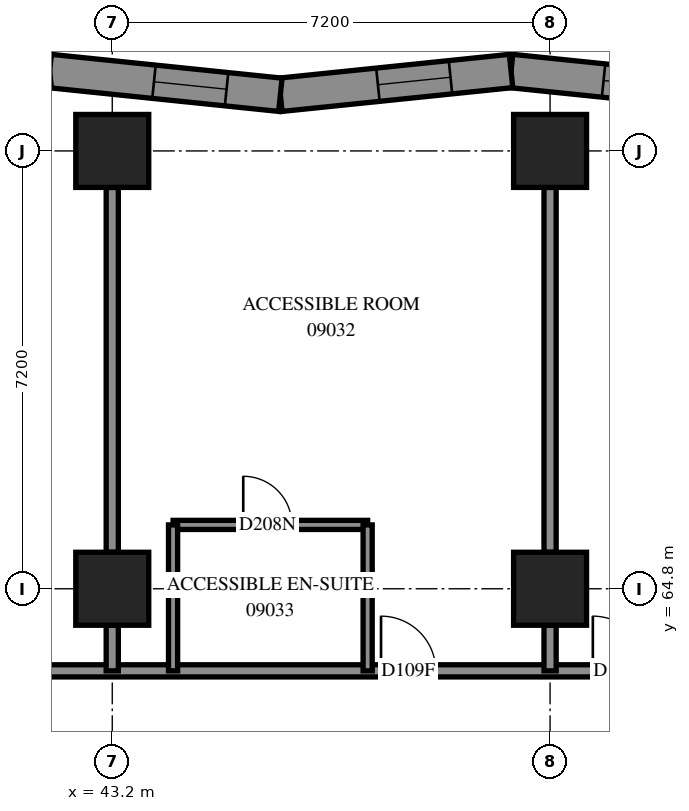
"""IFC4 building model, lengths in metres.
Left out: names, types, materials, properties, quantities, classifications, styles, units other than length and angle.
Written with IfcOpenShell. Run it as: python <this file> out.ifc"""

import sys

from ifc_helpers import new_model, si_unit, direction, frame, frame_2d, origin, origin_2d, place, context, subcontext, project, spatial, polyline, rectangle, outline, extrude, element, fill, save


model = new_model("IFC4")
c1 = context("Model", 3, precision=1e-05, world=origin(), true_north=direction((0.0, 1.0)))
c2 = subcontext(c1, "Body", "Model", "MODEL_VIEW")
j1 = project(units=[si_unit("LENGTHUNIT", "METRE"), si_unit("PLANEANGLEUNIT", "RADIAN")], contexts=[c1])
p1 = place(None, origin())
s1 = spatial("IfcSite", under=j1, at=p1, CompositionType="ELEMENT")
p2 = place(p1, origin())
s2 = spatial("IfcBuilding", under=s1, at=p2, CompositionType="ELEMENT")
p3 = place(p2, frame((0.0, 0.0, 37.2)))
s3 = spatial("IfcBuildingStorey", under=s2, at=p3, CompositionType="ELEMENT", Elevation=37.2)
for number, where, z_axis, x_axis in (
    (1, (43.2, 64.8, 0.0), (0.0, 0.0, 1.0), (1.0, 0.0, 0.0)),
    (2, (43.2, 72.0, 0.0), (0.0, 0.0, 1.0), (1.0, 0.0, 0.0)),
    (3, (50.4, 64.8, 0.0), (0.0, 0.0, 1.0), (1.0, 0.0, 0.0)),
    (4, (50.4, 72.0, 0.0), (0.0, 0.0, 1.0), (1.0, 0.0, 0.0)),
):
    element("IfcColumn", number, at=place(p3, frame(where, z_axis=z_axis, x_axis=x_axis)), inside=s3, PredefinedType="COLUMN", context=c2, shape_type="SweptSolid", body=[
        extrude(rectangle(XDim=1.2, YDim=1.2, at=origin_2d()), origin(), (0.0, 0.0, 1.0), 3.1),
    ])
p4 = place(p3, frame((53.552, 72.924, 0.0), z_axis=(0.0, 0.0, 1.0), x_axis=(-0.9947306832, 0.1025225234, 0.0)))
e5 = element("IfcWall", 5, at=p4, inside=s3, PredefinedType="SOLIDWALL", context=c2, shape_type="SweptSolid", body=[
    extrude(outline(polyline([(0.028, -0.275), (3.842, -0.275), (3.785, 0.275), (-0.028, 0.275), (0.028, -0.275)])), origin(), (0.0, 0.0, 1.0), 3.1),
])
p5 = place(p4, frame((1.084, 0.0, 0.5)))
e6 = element("IfcOpeningElement", 6, at=p5, cuts=e5, PredefinedType="OPENING", context=c2, shape_type="SweptSolid", body=[
    extrude(rectangle(XDim=1.2, YDim=2.45, at=frame_2d((0.6, 1.225))), frame((0.0, 0.285, 0.0), z_axis=(0.0, -1.0, 0.0), x_axis=(1.0, 0.0, 0.0)), (0.0, 0.0, 1.0), 0.57),
])
p6 = place(p3, frame((49.758, 73.314, 0.0), z_axis=(0.0, 0.0, 1.0), x_axis=(-0.9947306832, -0.1025225234, 0.0)))
e7 = element("IfcWall", 7, at=p6, inside=s3, PredefinedType="SOLIDWALL", context=c2, shape_type="SweptSolid", body=[
    extrude(outline(polyline([(-0.028, -0.275), (3.785, -0.275), (3.842, 0.275), (0.028, 0.275), (-0.028, -0.275)])), origin(), (0.0, 0.0, 1.0), 3.1),
])
p7 = place(p6, frame((1.001, 0.0, 0.5)))
e8 = element("IfcOpeningElement", 8, at=p7, cuts=e7, PredefinedType="OPENING", context=c2, shape_type="SweptSolid", body=[
    extrude(rectangle(XDim=1.2, YDim=2.45, at=frame_2d((0.6, 1.225))), frame((0.0, 0.285, 0.0), z_axis=(0.0, -1.0, 0.0), x_axis=(1.0, 0.0, 0.0)), (0.0, 0.0, 1.0), 0.57),
])
p8 = place(p3, frame((45.965, 72.924, 0.0), z_axis=(0.0, 0.0, 1.0), x_axis=(-0.9947304076, 0.1025251975, 0.0)))
e9 = element("IfcWall", 9, at=p8, inside=s3, PredefinedType="SOLIDWALL", context=c2, shape_type="SweptSolid", body=[
    extrude(outline(polyline([(0.028, -0.275), (3.842, -0.275), (3.785, 0.275), (-0.028, 0.275), (0.028, -0.275)])), origin(), (0.0, 0.0, 1.0), 3.1),
])
p9 = place(p8, frame((0.89, 0.0, 0.5)))
e10 = element("IfcOpeningElement", 10, at=p9, cuts=e9, PredefinedType="OPENING", context=c2, shape_type="SweptSolid", body=[
    extrude(rectangle(XDim=1.2, YDim=2.45, at=frame_2d((0.6, 1.225))), frame((0.0, 0.285, 0.0), z_axis=(0.0, -1.0, 0.0), x_axis=(1.0, 0.0, 0.0)), (0.0, 0.0, 1.0), 0.57),
])
p10 = place(p3, frame((33.452, 63.45, 0.0), z_axis=(0.0, 0.0, 1.0), x_axis=(1.0, 0.0, 0.0)))
e11 = element("IfcWall", 11, at=p10, inside=s3, PredefinedType="PARTITIONING", context=c2, shape_type="SweptSolid", body=[
    extrude(rectangle(XDim=21.648, YDim=0.2, at=frame_2d((10.824, 0.0))), origin(), (0.0, 0.0, 1.0), 3.1),
])
p11 = place(p10, frame((0.142, 0.0, 0.0)))
e12 = element("IfcOpeningElement", 12, at=p11, cuts=e11, PredefinedType="OPENING", context=c2, shape_type="SweptSolid", body=[
    extrude(rectangle(XDim=1.0, YDim=2.1, at=frame_2d((0.5, 1.05))), frame((0.0, 0.11, 0.0), z_axis=(0.0, -1.0, 0.0), x_axis=(1.0, 0.0, 0.0)), (0.0, 0.0, 1.0), 0.22),
])
p12 = place(p10, frame((6.412, 0.0, 0.0)))
e13 = element("IfcOpeningElement", 13, at=p12, cuts=e11, PredefinedType="OPENING", context=c2, shape_type="SweptSolid", body=[
    extrude(rectangle(XDim=0.9, YDim=2.1, at=frame_2d((0.45, 1.05))), frame((0.0, 0.11, 0.0), z_axis=(0.0, -1.0, 0.0), x_axis=(1.0, 0.0, 0.0)), (0.0, 0.0, 1.0), 0.22),
])
p13 = place(p10, frame((14.168, 0.0, 0.0)))
e14 = element("IfcOpeningElement", 14, at=p13, cuts=e11, PredefinedType="OPENING", context=c2, shape_type="SweptSolid", body=[
    extrude(rectangle(XDim=0.9, YDim=2.1, at=frame_2d((0.45, 1.05))), frame((0.0, 0.11, 0.0), z_axis=(0.0, -1.0, 0.0), x_axis=(1.0, 0.0, 0.0)), (0.0, 0.0, 1.0), 0.22),
])
p14 = place(p10, frame((17.651, 0.0, 0.0)))
e15 = element("IfcOpeningElement", 15, at=p14, cuts=e11, PredefinedType="OPENING", context=c2, shape_type="SweptSolid", body=[
    extrude(rectangle(XDim=0.9, YDim=2.1, at=frame_2d((0.45, 1.05))), frame((0.0, 0.11, 0.0), z_axis=(0.0, -1.0, 0.0), x_axis=(1.0, 0.0, 0.0)), (0.0, 0.0, 1.0), 0.22),
])
for number, where, z_axis, x_axis in (
    (16, (43.2, 65.4, 0.0), (0.0, 0.0, 1.0), (0.0, 1.0, 0.0)),
    (17, (50.4, 65.4, 0.0), (0.0, 0.0, 1.0), (0.0, 1.0, 0.0)),
):
    element("IfcWall", number, at=place(p3, frame(where, z_axis=z_axis, x_axis=x_axis)), inside=s3, PredefinedType="PARTITIONING", context=c2, shape_type="SweptSolid", body=[
        extrude(rectangle(XDim=6.0, YDim=0.2, at=frame_2d((3.0, 0.0))), origin(), (0.0, 0.0, 1.0), 3.1),
    ])
p15 = place(p3, frame((44.2, 65.85, 0.0), z_axis=(0.0, 0.0, 1.0), x_axis=(1.0, 0.0, 0.0)))
e18 = element("IfcWall", 18, at=p15, inside=s3, PredefinedType="PARTITIONING", context=c2, shape_type="SweptSolid", body=[
    extrude(rectangle(XDim=3.2, YDim=0.15, at=frame_2d((1.6, 0.0))), origin(), (0.0, 0.0, 1.0), 3.1),
])
p16 = place(p15, frame((1.154, 0.0, 0.0)))
e19 = element("IfcOpeningElement", 19, at=p16, cuts=e18, PredefinedType="OPENING", context=c2, shape_type="SweptSolid", body=[
    extrude(rectangle(XDim=0.8, YDim=2.1, at=frame_2d((0.4, 1.05))), frame((0.0, 0.085, 0.0), z_axis=(0.0, -1.0, 0.0), x_axis=(1.0, 0.0, 0.0)), (0.0, 0.0, 1.0), 0.17),
])
for number, where, z_axis, x_axis in (
    (20, (44.2, 63.45, 0.0), (0.0, 0.0, 1.0), (0.0, 1.0, 0.0)),
    (21, (47.4, 63.45, 0.0), (0.0, 0.0, 1.0), (0.0, 1.0, 0.0)),
):
    element("IfcWall", number, at=place(p3, frame(where, z_axis=z_axis, x_axis=x_axis)), inside=s3, PredefinedType="PARTITIONING", context=c2, shape_type="SweptSolid", body=[
        extrude(rectangle(XDim=2.4, YDim=0.15, at=frame_2d((1.2, 0.0))), origin(), (0.0, 0.0, 1.0), 3.1),
    ])
for number, where, z_axis, x_axis in (
    (22, (43.2, 63.45, 0.0), (0.0, 0.0, 1.0), (0.0, 1.0, 0.0)),
    (23, (50.4, 63.45, 0.0), (0.0, 0.0, 1.0), (0.0, 1.0, 0.0)),
):
    element("IfcWall", number, at=place(p3, frame(where, z_axis=z_axis, x_axis=x_axis)), inside=s3, PredefinedType="PARTITIONING", context=c2, shape_type="SweptSolid", body=[
        extrude(rectangle(XDim=0.75, YDim=0.2, at=frame_2d((0.375, 0.0))), origin(), (0.0, 0.0, 1.0), 3.1),
    ])
p17 = place(p5, origin())
e24 = element("IfcWindow", 24, at=p17, inside=s3, PartitioningType="SINGLE_PANEL", PredefinedType="WINDOW", context=c2, shape_type="SweptSolid", body=[
    extrude(rectangle(XDim=1.2, YDim=2.45, at=frame_2d((0.6, 1.225))), frame((0.0, 0.155, 0.0), z_axis=(0.0, -1.0, 0.0), x_axis=(1.0, 0.0, 0.0)), (0.0, 0.0, 1.0), 0.06),
])
fill(e6, e24)
p18 = place(p7, origin())
e25 = element("IfcWindow", 25, at=p18, inside=s3, PartitioningType="SINGLE_PANEL", PredefinedType="WINDOW", context=c2, shape_type="SweptSolid", body=[
    extrude(rectangle(XDim=1.2, YDim=2.45, at=frame_2d((0.6, 1.225))), frame((0.0, 0.155, 0.0), z_axis=(0.0, -1.0, 0.0), x_axis=(1.0, 0.0, 0.0)), (0.0, 0.0, 1.0), 0.06),
])
fill(e8, e25)
p19 = place(p9, origin())
e26 = element("IfcWindow", 26, at=p19, inside=s3, PartitioningType="SINGLE_PANEL", PredefinedType="WINDOW", context=c2, shape_type="SweptSolid", body=[
    extrude(rectangle(XDim=1.2, YDim=2.45, at=frame_2d((0.6, 1.225))), frame((0.0, 0.155, 0.0), z_axis=(0.0, -1.0, 0.0), x_axis=(1.0, 0.0, 0.0)), (0.0, 0.0, 1.0), 0.06),
])
fill(e10, e26)
p20 = place(p13, origin())
e27 = element("IfcDoor", 27, at=p20, inside=s3, OperationType="SINGLE_SWING_RIGHT", PredefinedType="DOOR", context=c2, shape_type="SweptSolid", body=[
    extrude(rectangle(XDim=0.9, YDim=2.1, at=frame_2d((0.45, 1.05))), frame((0.0, 0.025, 0.0), z_axis=(0.0, -1.0, 0.0), x_axis=(1.0, 0.0, 0.0)), (0.0, 0.0, 1.0), 0.05),
])
fill(e14, e27)
p21 = place(p16, origin())
e28 = element("IfcDoor", 28, at=p21, inside=s3, OperationType="SINGLE_SWING_RIGHT", PredefinedType="DOOR", context=c2, shape_type="SweptSolid", body=[
    extrude(rectangle(XDim=0.8, YDim=2.1, at=frame_2d((0.4, 1.05))), frame((0.0, 0.025, 0.0), z_axis=(0.0, -1.0, 0.0), x_axis=(1.0, 0.0, 0.0)), (0.0, 0.0, 1.0), 0.05),
])
fill(e19, e28)
p22 = place(p14, origin())
e29 = element("IfcDoor", 29, at=p22, inside=s3, OperationType="SINGLE_SWING_RIGHT", PredefinedType="DOOR", context=c2, shape_type="SweptSolid", body=[
    extrude(rectangle(XDim=0.9, YDim=2.1, at=frame_2d((0.45, 1.05))), frame((0.0, 0.025, 0.0), z_axis=(0.0, -1.0, 0.0), x_axis=(1.0, 0.0, 0.0)), (0.0, 0.0, 1.0), 0.05),
])
fill(e15, e29)
save(model, sys.argv[1])
